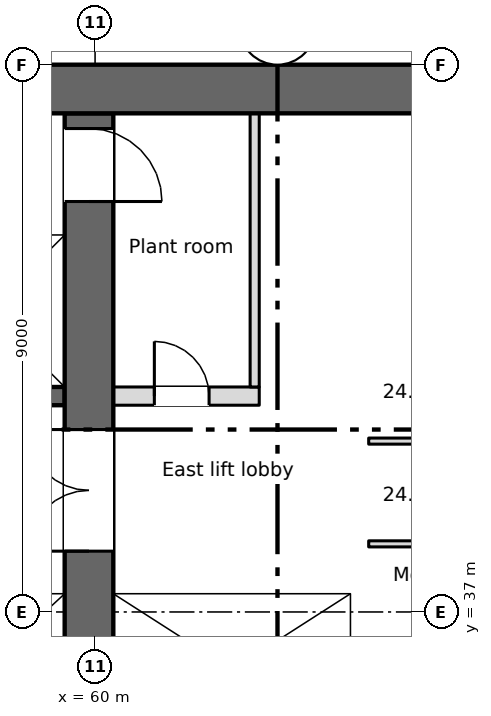
"""IFC4 building model, lengths in metres.
Left out: names, types, materials, properties, quantities, classifications, styles, units other than length and angle.
Written with IfcOpenShell. Run it as: python <this file> out.ifc"""

import sys

from ifc_helpers import new_model, si_unit, direction, frame, frame_2d, origin, place, context, subcontext, project, spatial, rectangle, extrude, element, fill, save


model = new_model("IFC4")
c1 = context("Model", 3, precision=1e-05, world=origin(), true_north=direction((0.0, 1.0)))
c2 = subcontext(c1, "Body", "Model", "MODEL_VIEW")
j1 = project(units=[si_unit("LENGTHUNIT", "METRE"), si_unit("PLANEANGLEUNIT", "RADIAN")], contexts=[c1])
p1 = place(None, origin())
s1 = spatial("IfcSite", under=j1, at=p1, CompositionType="ELEMENT")
p2 = place(p1, origin())
s2 = spatial("IfcBuilding", under=s1, at=p2, CompositionType="ELEMENT")
p3 = place(p2, frame((0.0, 0.0, 158.75)))
s3 = spatial("IfcBuildingStorey", under=s2, at=p3, CompositionType="ELEMENT", Elevation=158.75)
p4 = place(p3, frame((5.55, 45.6, 0.0), z_axis=(0.0, 0.0, 1.0), x_axis=(1.0, 0.0, 0.0)))
e1 = element("IfcWall", 1, at=p4, inside=s3, PredefinedType="SHEAR", context=c2, shape_type="SweptSolid", body=[
    extrude(rectangle(XDim=60.9, YDim=0.8, at=frame_2d((30.45, 0.0))), origin(), (0.0, 0.0, 1.0), 7.2),
])
p5 = place(p3, frame((64.35, 34.8, 0.0), z_axis=(0.0, 0.0, 1.0), x_axis=(0.0, 1.0, 0.0)))
e2 = element("IfcWall", 2, at=p5, inside=s3, PredefinedType="SHEAR", context=c2, shape_type="SweptSolid", body=[
    extrude(rectangle(XDim=10.4, YDim=0.3, at=frame_2d((5.2, 0.0))), origin(), (0.0, 0.0, 1.0), 7.2),
])
p6 = place(p3, frame((59.9, 28.4, 0.0), z_axis=(0.0, 0.0, 1.0), x_axis=(0.0, 1.0, 0.0)))
e3 = element("IfcWall", 3, at=p6, inside=s3, PredefinedType="SHEAR", context=c2, shape_type="SweptSolid", body=[
    extrude(rectangle(XDim=16.8, YDim=0.8, at=frame_2d((8.4, 0.0))), origin(), (0.0, 0.0, 1.0), 7.2),
])
p7 = place(p6, frame((9.6, 0.0, 0.0)))
e4 = element("IfcOpeningElement", 4, at=p7, cuts=e3, PredefinedType="OPENING", context=c2, shape_type="SweptSolid", body=[
    extrude(rectangle(XDim=2.0, YDim=2.1, at=frame_2d((1.0, 1.05))), frame((0.0, 0.41, 0.0), z_axis=(0.0, -1.0, 0.0), x_axis=(1.0, 0.0, 0.0)), (0.0, 0.0, 1.0), 0.82),
])
p8 = place(p6, frame((15.35, 0.0, 0.0)))
e5 = element("IfcOpeningElement", 5, at=p8, cuts=e3, PredefinedType="OPENING", context=c2, shape_type="SweptSolid", body=[
    extrude(rectangle(XDim=1.2, YDim=2.1, at=frame_2d((0.6, 1.05))), frame((0.0, 0.41, 0.0), z_axis=(0.0, -1.0, 0.0), x_axis=(1.0, 0.0, 0.0)), (0.0, 0.0, 1.0), 0.82),
])
p9 = place(p3, frame((47.3, 37.45, 0.0), z_axis=(0.0, 0.0, 1.0), x_axis=(1.0, 0.0, 0.0)))
e6 = element("IfcWall", 6, at=p9, inside=s3, PredefinedType="SHEAR", context=c2, shape_type="SweptSolid", body=[
    extrude(rectangle(XDim=12.2, YDim=0.3, at=frame_2d((6.1, 0.0))), origin(), (0.0, 0.0, 1.0), 7.2),
])
p10 = place(p9, frame((3.7, 0.0, 0.0)))
e7 = element("IfcOpeningElement", 7, at=p10, cuts=e6, PredefinedType="OPENING", context=c2, shape_type="SweptSolid", body=[
    extrude(rectangle(XDim=1.1, YDim=2.1, at=frame_2d((0.55, 1.05))), frame((0.0, 0.16, 0.0), z_axis=(0.0, -1.0, 0.0), x_axis=(1.0, 0.0, 0.0)), (0.0, 0.0, 1.0), 0.32),
])
p11 = place(p9, frame((4.9, 0.0, 0.0)))
e8 = element("IfcOpeningElement", 8, at=p11, cuts=e6, PredefinedType="OPENING", context=c2, shape_type="SweptSolid", body=[
    extrude(rectangle(XDim=1.1, YDim=2.1, at=frame_2d((0.55, 1.05))), frame((0.0, 0.16, 0.0), z_axis=(0.0, -1.0, 0.0), x_axis=(1.0, 0.0, 0.0)), (0.0, 0.0, 1.0), 0.32),
])
p12 = place(p9, frame((6.7, 0.0, 0.0)))
e9 = element("IfcOpeningElement", 9, at=p12, cuts=e6, PredefinedType="OPENING", context=c2, shape_type="SweptSolid", body=[
    extrude(rectangle(XDim=1.1, YDim=2.1, at=frame_2d((0.55, 1.05))), frame((0.0, 0.16, 0.0), z_axis=(0.0, -1.0, 0.0), x_axis=(1.0, 0.0, 0.0)), (0.0, 0.0, 1.0), 0.32),
])
p13 = place(p9, frame((7.9, 0.0, 0.0)))
e10 = element("IfcOpeningElement", 10, at=p13, cuts=e6, PredefinedType="OPENING", context=c2, shape_type="SweptSolid", body=[
    extrude(rectangle(XDim=1.1, YDim=2.1, at=frame_2d((0.55, 1.05))), frame((0.0, 0.16, 0.0), z_axis=(0.0, -1.0, 0.0), x_axis=(1.0, 0.0, 0.0)), (0.0, 0.0, 1.0), 0.32),
])
p14 = place(p9, frame((9.7, 0.0, 0.0)))
e11 = element("IfcOpeningElement", 11, at=p14, cuts=e6, PredefinedType="OPENING", context=c2, shape_type="SweptSolid", body=[
    extrude(rectangle(XDim=1.1, YDim=2.1, at=frame_2d((0.55, 1.05))), frame((0.0, 0.16, 0.0), z_axis=(0.0, -1.0, 0.0), x_axis=(1.0, 0.0, 0.0)), (0.0, 0.0, 1.0), 0.32),
])
p15 = place(p9, frame((10.9, 0.0, 0.0)))
e12 = element("IfcOpeningElement", 12, at=p15, cuts=e6, PredefinedType="OPENING", context=c2, shape_type="SweptSolid", body=[
    extrude(rectangle(XDim=1.1, YDim=2.1, at=frame_2d((0.55, 1.05))), frame((0.0, 0.16, 0.0), z_axis=(0.0, -1.0, 0.0), x_axis=(1.0, 0.0, 0.0)), (0.0, 0.0, 1.0), 0.32),
])
p16 = place(p3, frame((60.3, 37.45, 0.0), z_axis=(0.0, 0.0, 1.0), x_axis=(1.0, 0.0, 0.0)))
e13 = element("IfcWall", 13, at=p16, inside=s3, PredefinedType="SHEAR", context=c2, shape_type="SweptSolid", body=[
    extrude(rectangle(XDim=3.9, YDim=0.3, at=frame_2d((1.95, 0.0))), origin(), (0.0, 0.0, 1.0), 7.2),
])
p17 = place(p16, frame((1.4, 0.0, 0.0)))
e14 = element("IfcOpeningElement", 14, at=p17, cuts=e13, PredefinedType="OPENING", context=c2, shape_type="SweptSolid", body=[
    extrude(rectangle(XDim=1.1, YDim=2.1, at=frame_2d((0.55, 1.05))), frame((0.0, 0.16, 0.0), z_axis=(0.0, -1.0, 0.0), x_axis=(1.0, 0.0, 0.0)), (0.0, 0.0, 1.0), 0.32),
])
p18 = place(p3, frame((18.5, 40.55, 0.0), z_axis=(0.0, 0.0, 1.0), x_axis=(1.0, 0.0, 0.0)))
e15 = element("IfcWall", 15, at=p18, inside=s3, PredefinedType="SHEAR", context=c2, shape_type="SweptSolid", body=[
    extrude(rectangle(XDim=41.0, YDim=0.3, at=frame_2d((20.5, 0.0))), origin(), (0.0, 0.0, 1.0), 7.2),
])
p19 = place(p18, frame((15.9, 0.0, 0.0)))
e16 = element("IfcOpeningElement", 16, at=p19, cuts=e15, PredefinedType="OPENING", context=c2, shape_type="SweptSolid", body=[
    extrude(rectangle(XDim=0.9, YDim=2.1, at=frame_2d((0.45, 1.05))), frame((0.0, 0.16, 0.0), z_axis=(0.0, -1.0, 0.0), x_axis=(1.0, 0.0, 0.0)), (0.0, 0.0, 1.0), 0.32),
])
p20 = place(p18, frame((21.4, 0.0, 0.0)))
e17 = element("IfcOpeningElement", 17, at=p20, cuts=e15, PredefinedType="OPENING", context=c2, shape_type="SweptSolid", body=[
    extrude(rectangle(XDim=0.9, YDim=2.1, at=frame_2d((0.45, 1.05))), frame((0.0, 0.16, 0.0), z_axis=(0.0, -1.0, 0.0), x_axis=(1.0, 0.0, 0.0)), (0.0, 0.0, 1.0), 0.32),
])
p21 = place(p18, frame((0.675, 0.0, 0.0)))
e18 = element("IfcOpeningElement", 18, at=p21, cuts=e15, PredefinedType="OPENING", context=c2, shape_type="SweptSolid", body=[
    extrude(rectangle(XDim=1.1, YDim=2.1, at=frame_2d((0.55, 1.05))), frame((0.0, 0.16, 0.0), z_axis=(0.0, -1.0, 0.0), x_axis=(1.0, 0.0, 0.0)), (0.0, 0.0, 1.0), 0.32),
])
p22 = place(p18, frame((3.425, 0.0, 0.0)))
e19 = element("IfcOpeningElement", 19, at=p22, cuts=e15, PredefinedType="OPENING", context=c2, shape_type="SweptSolid", body=[
    extrude(rectangle(XDim=1.1, YDim=2.1, at=frame_2d((0.55, 1.05))), frame((0.0, 0.16, 0.0), z_axis=(0.0, -1.0, 0.0), x_axis=(1.0, 0.0, 0.0)), (0.0, 0.0, 1.0), 0.32),
])
p23 = place(p18, frame((5.575, 0.0, 0.0)))
e20 = element("IfcOpeningElement", 20, at=p23, cuts=e15, PredefinedType="OPENING", context=c2, shape_type="SweptSolid", body=[
    extrude(rectangle(XDim=1.1, YDim=2.1, at=frame_2d((0.55, 1.05))), frame((0.0, 0.16, 0.0), z_axis=(0.0, -1.0, 0.0), x_axis=(1.0, 0.0, 0.0)), (0.0, 0.0, 1.0), 0.32),
])
p24 = place(p18, frame((6.775, 0.0, 0.0)))
e21 = element("IfcOpeningElement", 21, at=p24, cuts=e15, PredefinedType="OPENING", context=c2, shape_type="SweptSolid", body=[
    extrude(rectangle(XDim=1.1, YDim=2.1, at=frame_2d((0.55, 1.05))), frame((0.0, 0.16, 0.0), z_axis=(0.0, -1.0, 0.0), x_axis=(1.0, 0.0, 0.0)), (0.0, 0.0, 1.0), 0.32),
])
p25 = place(p18, frame((8.325, 0.0, 0.0)))
e22 = element("IfcOpeningElement", 22, at=p25, cuts=e15, PredefinedType="OPENING", context=c2, shape_type="SweptSolid", body=[
    extrude(rectangle(XDim=1.1, YDim=2.1, at=frame_2d((0.55, 1.05))), frame((0.0, 0.16, 0.0), z_axis=(0.0, -1.0, 0.0), x_axis=(1.0, 0.0, 0.0)), (0.0, 0.0, 1.0), 0.32),
])
p26 = place(p18, frame((9.525, 0.0, 0.0)))
e23 = element("IfcOpeningElement", 23, at=p26, cuts=e15, PredefinedType="OPENING", context=c2, shape_type="SweptSolid", body=[
    extrude(rectangle(XDim=1.1, YDim=2.1, at=frame_2d((0.55, 1.05))), frame((0.0, 0.16, 0.0), z_axis=(0.0, -1.0, 0.0), x_axis=(1.0, 0.0, 0.0)), (0.0, 0.0, 1.0), 0.32),
])
p27 = place(p18, frame((11.075, 0.0, 0.0)))
e24 = element("IfcOpeningElement", 24, at=p27, cuts=e15, PredefinedType="OPENING", context=c2, shape_type="SweptSolid", body=[
    extrude(rectangle(XDim=1.1, YDim=2.1, at=frame_2d((0.55, 1.05))), frame((0.0, 0.16, 0.0), z_axis=(0.0, -1.0, 0.0), x_axis=(1.0, 0.0, 0.0)), (0.0, 0.0, 1.0), 0.32),
])
p28 = place(p18, frame((12.275, 0.0, 0.0)))
e25 = element("IfcOpeningElement", 25, at=p28, cuts=e15, PredefinedType="OPENING", context=c2, shape_type="SweptSolid", body=[
    extrude(rectangle(XDim=1.1, YDim=2.1, at=frame_2d((0.55, 1.05))), frame((0.0, 0.16, 0.0), z_axis=(0.0, -1.0, 0.0), x_axis=(1.0, 0.0, 0.0)), (0.0, 0.0, 1.0), 0.32),
])
p29 = place(p18, frame((25.425, 0.0, 0.0)))
e26 = element("IfcOpeningElement", 26, at=p29, cuts=e15, PredefinedType="OPENING", context=c2, shape_type="SweptSolid", body=[
    extrude(rectangle(XDim=1.1, YDim=2.1, at=frame_2d((0.55, 1.05))), frame((0.0, 0.16, 0.0), z_axis=(0.0, -1.0, 0.0), x_axis=(1.0, 0.0, 0.0)), (0.0, 0.0, 1.0), 0.32),
])
p30 = place(p18, frame((28.175, 0.0, 0.0)))
e27 = element("IfcOpeningElement", 27, at=p30, cuts=e15, PredefinedType="OPENING", context=c2, shape_type="SweptSolid", body=[
    extrude(rectangle(XDim=1.1, YDim=2.1, at=frame_2d((0.55, 1.05))), frame((0.0, 0.16, 0.0), z_axis=(0.0, -1.0, 0.0), x_axis=(1.0, 0.0, 0.0)), (0.0, 0.0, 1.0), 0.32),
])
p31 = place(p18, frame((30.325, 0.0, 0.0)))
e28 = element("IfcOpeningElement", 28, at=p31, cuts=e15, PredefinedType="OPENING", context=c2, shape_type="SweptSolid", body=[
    extrude(rectangle(XDim=1.1, YDim=2.1, at=frame_2d((0.55, 1.05))), frame((0.0, 0.16, 0.0), z_axis=(0.0, -1.0, 0.0), x_axis=(1.0, 0.0, 0.0)), (0.0, 0.0, 1.0), 0.32),
])
p32 = place(p18, frame((31.525, 0.0, 0.0)))
e29 = element("IfcOpeningElement", 29, at=p32, cuts=e15, PredefinedType="OPENING", context=c2, shape_type="SweptSolid", body=[
    extrude(rectangle(XDim=1.1, YDim=2.1, at=frame_2d((0.55, 1.05))), frame((0.0, 0.16, 0.0), z_axis=(0.0, -1.0, 0.0), x_axis=(1.0, 0.0, 0.0)), (0.0, 0.0, 1.0), 0.32),
])
p33 = place(p18, frame((33.075, 0.0, 0.0)))
e30 = element("IfcOpeningElement", 30, at=p33, cuts=e15, PredefinedType="OPENING", context=c2, shape_type="SweptSolid", body=[
    extrude(rectangle(XDim=1.1, YDim=2.1, at=frame_2d((0.55, 1.05))), frame((0.0, 0.16, 0.0), z_axis=(0.0, -1.0, 0.0), x_axis=(1.0, 0.0, 0.0)), (0.0, 0.0, 1.0), 0.32),
])
p34 = place(p18, frame((34.275, 0.0, 0.0)))
e31 = element("IfcOpeningElement", 31, at=p34, cuts=e15, PredefinedType="OPENING", context=c2, shape_type="SweptSolid", body=[
    extrude(rectangle(XDim=1.1, YDim=2.1, at=frame_2d((0.55, 1.05))), frame((0.0, 0.16, 0.0), z_axis=(0.0, -1.0, 0.0), x_axis=(1.0, 0.0, 0.0)), (0.0, 0.0, 1.0), 0.32),
])
p35 = place(p18, frame((36.375, 0.0, 0.0)))
e32 = element("IfcOpeningElement", 32, at=p35, cuts=e15, PredefinedType="OPENING", context=c2, shape_type="SweptSolid", body=[
    extrude(rectangle(XDim=1.2, YDim=2.1, at=frame_2d((0.6, 1.05))), frame((0.0, 0.16, 0.0), z_axis=(0.0, -1.0, 0.0), x_axis=(1.0, 0.0, 0.0)), (0.0, 0.0, 1.0), 0.32),
])
p36 = place(p18, frame((39.15, 0.0, 0.0)))
e33 = element("IfcOpeningElement", 33, at=p36, cuts=e15, PredefinedType="OPENING", context=c2, shape_type="SweptSolid", body=[
    extrude(rectangle(XDim=1.2, YDim=2.1, at=frame_2d((0.6, 1.05))), frame((0.0, 0.16, 0.0), z_axis=(0.0, -1.0, 0.0), x_axis=(1.0, 0.0, 0.0)), (0.0, 0.0, 1.0), 0.32),
])
p37 = place(p3, frame((18.5, 43.35, 0.0), z_axis=(0.0, 0.0, 1.0), x_axis=(1.0, 0.0, 0.0)))
e34 = element("IfcWall", 34, at=p37, inside=s3, PredefinedType="SHEAR", context=c2, shape_type="SweptSolid", body=[
    extrude(rectangle(XDim=41.0, YDim=0.3, at=frame_2d((20.5, 0.0))), origin(), (0.0, 0.0, 1.0), 7.2),
])
p38 = place(p3, frame((60.3, 40.55, 0.0), z_axis=(0.0, 0.0, 1.0), x_axis=(1.0, 0.0, 0.0)))
e35 = element("IfcWall", 35, at=p38, inside=s3, PredefinedType="PARTITIONING", context=c2, shape_type="SweptSolid", body=[
    extrude(rectangle(XDim=2.4, YDim=0.3, at=frame_2d((1.2, 0.0))), origin(), (0.0, 0.0, 1.0), 7.2),
])
p39 = place(p38, frame((0.675, 0.0, 0.0)))
e36 = element("IfcOpeningElement", 36, at=p39, cuts=e35, PredefinedType="OPENING", context=c2, shape_type="SweptSolid", body=[
    extrude(rectangle(XDim=0.9, YDim=2.1, at=frame_2d((0.45, 1.05))), frame((0.0, 0.16, 0.0), z_axis=(0.0, -1.0, 0.0), x_axis=(1.0, 0.0, 0.0)), (0.0, 0.0, 1.0), 0.32),
])
p40 = place(p3, frame((62.625, 40.7, 0.0), z_axis=(0.0, 0.0, 1.0), x_axis=(0.0, 1.0, 0.0)))
e37 = element("IfcWall", 37, at=p40, inside=s3, PredefinedType="PARTITIONING", context=c2, shape_type="SweptSolid", body=[
    extrude(rectangle(XDim=4.5, YDim=0.15, at=frame_2d((2.25, 0.0))), origin(), (0.0, 0.0, 1.0), 7.2),
])
for number, where, z_axis, x_axis in (
    (38, (64.5, 38.12, 0.0), (0.0, 0.0, 1.0), (1.0, 0.0, 0.0)),
    (39, (64.5, 39.81, 0.0), (0.0, 0.0, 1.0), (1.0, 0.0, 0.0)),
):
    element("IfcWall", number, at=place(p3, frame(where, z_axis=z_axis, x_axis=x_axis)), inside=s3, PredefinedType="PARTITIONING", context=c2, shape_type="SweptSolid", body=[
        extrude(rectangle(XDim=4.35, YDim=0.1, at=frame_2d((2.175, 0.0))), origin(), (0.0, 0.0, 1.0), 7.2),
    ])
p41 = place(p39, origin())
e40 = element("IfcDoor", 40, at=p41, inside=s3, OperationType="SINGLE_SWING_LEFT", PredefinedType="DOOR", context=c2, shape_type="SweptSolid", body=[
    extrude(rectangle(XDim=0.9, YDim=2.1, at=frame_2d((0.45, 1.05))), frame((0.0, 0.025, 0.0), z_axis=(0.0, -1.0, 0.0), x_axis=(1.0, 0.0, 0.0)), (0.0, 0.0, 1.0), 0.05),
])
fill(e36, e40)
p42 = place(p17, origin())
e41 = element("IfcDoor", 41, at=p42, inside=s3, OperationType="SLIDING_TO_LEFT", PredefinedType="DOOR", context=c2, shape_type="SweptSolid", body=[
    extrude(rectangle(XDim=1.1, YDim=2.1, at=frame_2d((0.55, 1.05))), frame((0.0, 0.025, 0.0), z_axis=(0.0, -1.0, 0.0), x_axis=(1.0, 0.0, 0.0)), (0.0, 0.0, 1.0), 0.05),
])
fill(e14, e41)
p43 = place(p7, origin())
e42 = element("IfcDoor", 42, at=p43, inside=s3, OperationType="DOUBLE_DOOR_SINGLE_SWING", PredefinedType="DOOR", context=c2, shape_type="SweptSolid", body=[
    extrude(rectangle(XDim=2.0, YDim=2.1, at=frame_2d((1.0, 1.05))), frame((0.0, 0.025, 0.0), z_axis=(0.0, -1.0, 0.0), x_axis=(1.0, 0.0, 0.0)), (0.0, 0.0, 1.0), 0.05),
])
fill(e4, e42)
p44 = place(p8, origin())
e43 = element("IfcDoor", 43, at=p44, inside=s3, OperationType="SINGLE_SWING_LEFT", PredefinedType="DOOR", context=c2, shape_type="SweptSolid", body=[
    extrude(rectangle(XDim=1.2, YDim=2.1, at=frame_2d((0.6, 1.05))), frame((0.0, 0.025, 0.0), z_axis=(0.0, -1.0, 0.0), x_axis=(1.0, 0.0, 0.0)), (0.0, 0.0, 1.0), 0.05),
])
fill(e5, e43)
save(model, sys.argv[1])
